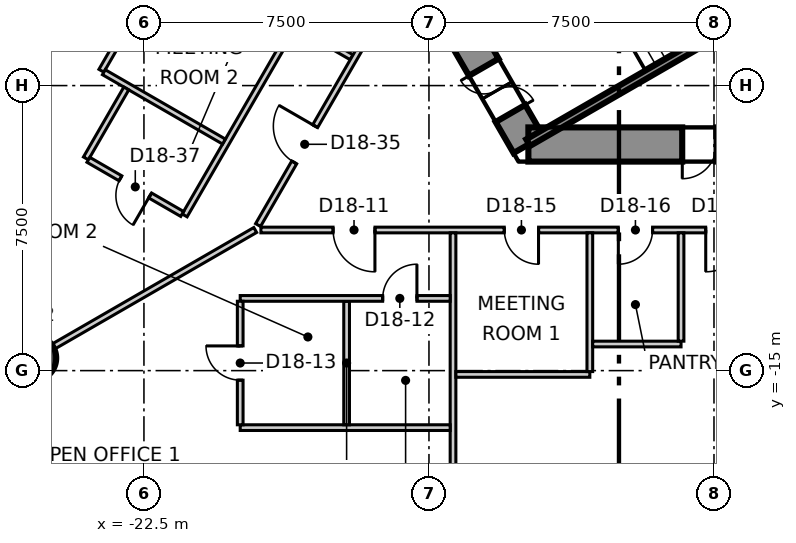
"""IFC4 building model, lengths in metres.
Left out: names, types, materials, properties, quantities, classifications, styles, units other than length and angle.
Written with IfcOpenShell. Run it as: python <this file> out.ifc"""

import sys

from ifc_helpers import new_model, si_unit, direction, frame, frame_2d, origin, origin_2d, place, context, subcontext, project, spatial, polyline, rectangle, circle, outline, extrude, element, fill, save


model = new_model("IFC4")
c1 = context("Model", 3, precision=1e-05, world=origin(), true_north=direction((0.0, 1.0)))
c2 = subcontext(c1, "Body", "Model", "MODEL_VIEW")
j1 = project(units=[si_unit("LENGTHUNIT", "METRE"), si_unit("PLANEANGLEUNIT", "RADIAN")], contexts=[c1])
p1 = place(None, origin())
s1 = spatial("IfcSite", under=j1, at=p1, CompositionType="ELEMENT")
p2 = place(p1, origin())
s2 = spatial("IfcBuilding", under=s1, at=p2, CompositionType="ELEMENT")
p3 = place(p2, frame((0.0, 0.0, 83.3)))
s3 = spatial("IfcBuildingStorey", under=s2, at=p3, CompositionType="ELEMENT", Elevation=83.3)
p4 = place(p3, frame((-14.03, -6.2, -0.3), z_axis=(0.0, 0.0, 1.0), x_axis=(0.500111984565, -0.865960739811, 0.0)))
e1 = element("IfcWall", 1, at=p4, inside=s3, PredefinedType="SHEAR", context=c2, shape_type="SweptSolid", body=[
    extrude(outline(polyline([(-0.26, -0.449), (1.646, -0.449), (3.551, -0.45), (3.032, 0.45), (1.646, 0.45), (0.26, 0.45), (-0.26, -0.449)])), origin(), (0.0, 0.0, 1.0), 4.0),
])
p5 = place(p4, frame((0.946, 0.0, 0.3)))
e2 = element("IfcOpeningElement", 2, at=p5, cuts=e1, PredefinedType="OPENING", context=c2, shape_type="SweptSolid", body=[
    extrude(rectangle(XDim=1.4, YDim=2.1, at=frame_2d((0.7, 1.05))), frame((0.0, 0.46, 0.0), z_axis=(0.0, -1.0, 0.0), x_axis=(1.0, 0.0, 0.0)), (0.0, 0.0, 1.0), 0.92),
])
p6 = place(p3, frame((-12.384, -9.05, -0.3), z_axis=(0.0, 0.0, 1.0), x_axis=(1.0, 0.0, 0.0)))
e3 = element("IfcWall", 3, at=p6, inside=s3, PredefinedType="SHEAR", context=c2, shape_type="SweptSolid", body=[
    extrude(outline(polyline([(-0.26, -0.45), (1.685, -0.45), (3.63, -0.45), (5.576, -0.45), (7.521, -0.45), (9.466, -0.45), (11.411, -0.45), (13.357, -0.45), (15.302, -0.45), (17.247, -0.45), (19.192, -0.45), (21.138, -0.45), (23.083, -0.45), (25.028, -0.45), (24.508, 0.45), (22.643, 0.45), (20.778, 0.45), (18.912, 0.45), (17.047, 0.45), (15.182, 0.45), (13.317, 0.45), (11.451, 0.45), (9.586, 0.45), (7.721, 0.45), (5.856, 0.45), (3.99, 0.45), (2.125, 0.45), (0.26, 0.45), (-0.26, -0.45)])), origin(), (0.0, 0.0, 1.0), 4.0),
])
p7 = place(p6, frame((4.05, 0.0, 0.3)))
e4 = element("IfcOpeningElement", 4, at=p7, cuts=e3, PredefinedType="OPENING", context=c2, shape_type="SweptSolid", body=[
    extrude(rectangle(XDim=0.9, YDim=2.1, at=frame_2d((0.45, 1.05))), frame((0.0, 0.46, 0.0), z_axis=(0.0, -1.0, 0.0), x_axis=(1.0, 0.0, 0.0)), (0.0, 0.0, 1.0), 0.92),
])
p8 = place(p6, frame((15.32, 0.0, 0.3)))
e5 = element("IfcOpeningElement", 5, at=p8, cuts=e3, PredefinedType="OPENING", context=c2, shape_type="SweptSolid", body=[
    extrude(rectangle(XDim=0.9, YDim=2.1, at=frame_2d((0.45, 1.05))), frame((0.0, 0.46, 0.0), z_axis=(0.0, -1.0, 0.0), x_axis=(1.0, 0.0, 0.0)), (0.0, 0.0, 1.0), 0.92),
])
p9 = place(p3, frame((-25.409, -14.67, -0.3), z_axis=(0.0, 0.0, 1.0), x_axis=(1.0, 0.0, 0.0)))
e6 = element("IfcColumn", 6, at=p9, inside=s3, PredefinedType="COLUMN", context=c2, shape_type="SweptSolid", body=[
    extrude(circle(Radius=0.6, at=origin_2d()), origin(), (0.0, 0.0, 1.0), 4.0),
])
p10 = place(p3, frame((-3.28, 36.577, 0.0), z_axis=(0.0, 0.0, 1.0), x_axis=(-0.500001635065, -0.866024459777, 0.0)))
e7 = element("IfcWall", 7, at=p10, inside=s3, PredefinedType="ELEMENTEDWALL", context=c2, shape_type="SweptSolid", body=[
    extrude(rectangle(XDim=60.053, YDim=0.2, at=frame_2d((30.027, 0.0))), origin(), (0.0, 0.0, 1.0), 3.7),
])
p11 = place(p10, frame((2.094, 0.0, 0.9)))
e8 = element("IfcOpeningElement", 8, at=p11, cuts=e7, PredefinedType="OPENING", context=c2, shape_type="SweptSolid", body=[
    extrude(rectangle(XDim=5.6, YDim=2.5, at=frame_2d((2.8, 1.25))), frame((0.0, 0.11, 0.0), z_axis=(0.0, -1.0, 0.0), x_axis=(1.0, 0.0, 0.0)), (0.0, 0.0, 1.0), 0.22),
])
p12 = place(p10, frame((9.278, 0.0, 0.9)))
e9 = element("IfcOpeningElement", 9, at=p12, cuts=e7, PredefinedType="OPENING", context=c2, shape_type="SweptSolid", body=[
    extrude(rectangle(XDim=5.6, YDim=2.5, at=frame_2d((2.8, 1.25))), frame((0.0, 0.11, 0.0), z_axis=(0.0, -1.0, 0.0), x_axis=(1.0, 0.0, 0.0)), (0.0, 0.0, 1.0), 0.22),
])
p13 = place(p10, frame((16.461, 0.0, 0.9)))
e10 = element("IfcOpeningElement", 10, at=p13, cuts=e7, PredefinedType="OPENING", context=c2, shape_type="SweptSolid", body=[
    extrude(rectangle(XDim=5.6, YDim=2.5, at=frame_2d((2.8, 1.25))), frame((0.0, 0.11, 0.0), z_axis=(0.0, -1.0, 0.0), x_axis=(1.0, 0.0, 0.0)), (0.0, 0.0, 1.0), 0.22),
])
p14 = place(p10, frame((23.645, 0.0, 0.9)))
e11 = element("IfcOpeningElement", 11, at=p14, cuts=e7, PredefinedType="OPENING", context=c2, shape_type="SweptSolid", body=[
    extrude(rectangle(XDim=5.6, YDim=2.5, at=frame_2d((2.8, 1.25))), frame((0.0, 0.11, 0.0), z_axis=(0.0, -1.0, 0.0), x_axis=(1.0, 0.0, 0.0)), (0.0, 0.0, 1.0), 0.22),
])
p15 = place(p10, frame((30.828, 0.0, 0.9)))
e12 = element("IfcOpeningElement", 12, at=p15, cuts=e7, PredefinedType="OPENING", context=c2, shape_type="SweptSolid", body=[
    extrude(rectangle(XDim=5.6, YDim=2.5, at=frame_2d((2.8, 1.25))), frame((0.0, 0.11, 0.0), z_axis=(0.0, -1.0, 0.0), x_axis=(1.0, 0.0, 0.0)), (0.0, 0.0, 1.0), 0.22),
])
p16 = place(p10, frame((38.012, 0.0, 0.9)))
e13 = element("IfcOpeningElement", 13, at=p16, cuts=e7, PredefinedType="OPENING", context=c2, shape_type="SweptSolid", body=[
    extrude(rectangle(XDim=5.6, YDim=2.5, at=frame_2d((2.8, 1.25))), frame((0.0, 0.11, 0.0), z_axis=(0.0, -1.0, 0.0), x_axis=(1.0, 0.0, 0.0)), (0.0, 0.0, 1.0), 0.22),
])
p17 = place(p10, frame((45.195, 0.0, 0.9)))
e14 = element("IfcOpeningElement", 14, at=p17, cuts=e7, PredefinedType="OPENING", context=c2, shape_type="SweptSolid", body=[
    extrude(rectangle(XDim=5.6, YDim=2.5, at=frame_2d((2.8, 1.25))), frame((0.0, 0.11, 0.0), z_axis=(0.0, -1.0, 0.0), x_axis=(1.0, 0.0, 0.0)), (0.0, 0.0, 1.0), 0.22),
])
p18 = place(p10, frame((52.379, 0.0, 0.9)))
e15 = element("IfcOpeningElement", 15, at=p18, cuts=e7, PredefinedType="OPENING", context=c2, shape_type="SweptSolid", body=[
    extrude(rectangle(XDim=5.6, YDim=2.5, at=frame_2d((2.8, 1.25))), frame((0.0, 0.11, 0.0), z_axis=(0.0, -1.0, 0.0), x_axis=(1.0, 0.0, 0.0)), (0.0, 0.0, 1.0), 0.22),
])
p19 = place(p3, frame((-25.946, -14.98, 0.0), z_axis=(0.0, 0.0, 1.0), x_axis=(0.866032022822, 0.499988535315, 0.0)))
e16 = element("IfcWall", 16, at=p19, inside=s3, PredefinedType="PARTITIONING", context=c2, shape_type="SweptSolid", body=[
    extrude(rectangle(XDim=7.36, YDim=0.15, at=frame_2d((3.68, 0.0))), origin(), (0.0, 0.0, 1.0), 3.15),
])
p20 = place(p3, frame((-25.413, -1.918, 0.0), z_axis=(0.0, 0.0, 1.0), x_axis=(0.866035557451, -0.499982412921, 0.0)))
e17 = element("IfcWall", 17, at=p20, inside=s3, PredefinedType="PARTITIONING", context=c2, shape_type="SweptSolid", body=[
    extrude(rectangle(XDim=9.674, YDim=0.15, at=frame_2d((4.837, 0.0))), origin(), (0.0, 0.0, 1.0), 3.7),
])
p21 = place(p3, frame((-19.497, -11.17, 0.0), z_axis=(0.0, 0.0, 1.0), x_axis=(0.499998854553, 0.866026065108, 0.0)))
e18 = element("IfcWall", 18, at=p21, inside=s3, PredefinedType="PARTITIONING", context=c2, shape_type="SweptSolid", body=[
    extrude(rectangle(XDim=38.994, YDim=0.15, at=frame_2d((19.497, 0.0))), origin(), (0.0, 0.0, 1.0), 3.7),
])
p22 = place(p21, frame((35.844, 0.0, 0.0)))
e19 = element("IfcOpeningElement", 19, at=p22, cuts=e18, PredefinedType="OPENING", context=c2, shape_type="SweptSolid", body=[
    extrude(rectangle(XDim=1.1, YDim=2.1, at=frame_2d((0.55, 1.05))), frame((0.0, 0.085, 0.0), z_axis=(0.0, -1.0, 0.0), x_axis=(1.0, 0.0, 0.0)), (0.0, 0.0, 1.0), 0.17),
])
p23 = place(p21, frame((26.04, 0.0, 0.0)))
e20 = element("IfcOpeningElement", 20, at=p23, cuts=e18, PredefinedType="OPENING", context=c2, shape_type="SweptSolid", body=[
    extrude(rectangle(XDim=1.1, YDim=2.1, at=frame_2d((0.55, 1.05))), frame((0.0, 0.085, 0.0), z_axis=(0.0, -1.0, 0.0), x_axis=(1.0, 0.0, 0.0)), (0.0, 0.0, 1.0), 0.17),
])
p24 = place(p21, frame((7.272, 0.0, 0.0)))
e21 = element("IfcOpeningElement", 21, at=p24, cuts=e18, PredefinedType="OPENING", context=c2, shape_type="SweptSolid", body=[
    extrude(rectangle(XDim=1.1, YDim=2.1, at=frame_2d((0.55, 1.05))), frame((0.0, 0.085, 0.0), z_axis=(0.0, -1.0, 0.0), x_axis=(1.0, 0.0, 0.0)), (0.0, 0.0, 1.0), 0.17),
])
p25 = place(p21, frame((17.372, 0.0, 0.0)))
e22 = element("IfcOpeningElement", 22, at=p25, cuts=e18, PredefinedType="OPENING", context=c2, shape_type="SweptSolid", body=[
    extrude(rectangle(XDim=0.9, YDim=2.1, at=frame_2d((0.45, 1.05))), frame((0.0, 0.085, 0.0), z_axis=(0.0, -1.0, 0.0), x_axis=(1.0, 0.0, 0.0)), (0.0, 0.0, 1.0), 0.17),
])
p26 = place(p21, frame((14.172, 0.0, 0.0)))
e23 = element("IfcOpeningElement", 23, at=p26, cuts=e18, PredefinedType="OPENING", context=c2, shape_type="SweptSolid", body=[
    extrude(rectangle(XDim=0.9, YDim=2.1, at=frame_2d((0.45, 1.05))), frame((0.0, 0.085, 0.0), z_axis=(0.0, -1.0, 0.0), x_axis=(1.0, 0.0, 0.0)), (0.0, 0.0, 1.0), 0.17),
])
p27 = place(p21, frame((11.272, 0.0, 0.0)))
e24 = element("IfcOpeningElement", 24, at=p27, cuts=e18, PredefinedType="OPENING", context=c2, shape_type="SweptSolid", body=[
    extrude(rectangle(XDim=1.0, YDim=2.1, at=frame_2d((0.5, 1.05))), frame((0.0, 0.085, 0.0), z_axis=(0.0, -1.0, 0.0), x_axis=(1.0, 0.0, 0.0)), (0.0, 0.0, 1.0), 0.17),
])
p28 = place(p21, frame((1.904, 0.0, 0.0)))
e25 = element("IfcOpeningElement", 25, at=p28, cuts=e18, PredefinedType="OPENING", context=c2, shape_type="SweptSolid", body=[
    extrude(rectangle(XDim=1.1, YDim=2.1, at=frame_2d((0.55, 1.05))), frame((0.0, 0.085, 0.0), z_axis=(0.0, -1.0, 0.0), x_axis=(1.0, 0.0, 0.0)), (0.0, 0.0, 1.0), 0.17),
])
p29 = place(p3, frame((-19.422, -11.3, 0.0), z_axis=(0.0, 0.0, 1.0), x_axis=(1.0, 0.0, 0.0)))
e26 = element("IfcWall", 26, at=p29, inside=s3, PredefinedType="PARTITIONING", context=c2, shape_type="SweptSolid", body=[
    extrude(rectangle(XDim=38.994, YDim=0.15, at=frame_2d((19.497, 0.0))), origin(), (0.0, 0.0, 1.0), 3.7),
])
p30 = place(p29, frame((1.9, 0.0, 0.0)))
e27 = element("IfcOpeningElement", 27, at=p30, cuts=e26, PredefinedType="OPENING", context=c2, shape_type="SweptSolid", body=[
    extrude(rectangle(XDim=1.1, YDim=2.1, at=frame_2d((0.55, 1.05))), frame((0.0, 0.085, 0.0), z_axis=(0.0, -1.0, 0.0), x_axis=(1.0, 0.0, 0.0)), (0.0, 0.0, 1.0), 0.17),
])
p31 = place(p29, frame((11.705, 0.0, 0.0)))
e28 = element("IfcOpeningElement", 28, at=p31, cuts=e26, PredefinedType="OPENING", context=c2, shape_type="SweptSolid", body=[
    extrude(rectangle(XDim=1.1, YDim=2.1, at=frame_2d((0.55, 1.05))), frame((0.0, 0.085, 0.0), z_axis=(0.0, -1.0, 0.0), x_axis=(1.0, 0.0, 0.0)), (0.0, 0.0, 1.0), 0.17),
])
p32 = place(p29, frame((6.405, 0.0, 0.0)))
e29 = element("IfcOpeningElement", 29, at=p32, cuts=e26, PredefinedType="OPENING", context=c2, shape_type="SweptSolid", body=[
    extrude(rectangle(XDim=0.9, YDim=2.1, at=frame_2d((0.45, 1.05))), frame((0.0, 0.085, 0.0), z_axis=(0.0, -1.0, 0.0), x_axis=(1.0, 0.0, 0.0)), (0.0, 0.0, 1.0), 0.17),
])
p33 = place(p29, frame((9.405, 0.0, 0.0)))
e30 = element("IfcOpeningElement", 30, at=p33, cuts=e26, PredefinedType="OPENING", context=c2, shape_type="SweptSolid", body=[
    extrude(rectangle(XDim=0.9, YDim=2.1, at=frame_2d((0.45, 1.05))), frame((0.0, 0.085, 0.0), z_axis=(0.0, -1.0, 0.0), x_axis=(1.0, 0.0, 0.0)), (0.0, 0.0, 1.0), 0.17),
])
p34 = place(p29, frame((22.472, 0.0, 0.0)))
e31 = element("IfcOpeningElement", 31, at=p34, cuts=e26, PredefinedType="OPENING", context=c2, shape_type="SweptSolid", body=[
    extrude(rectangle(XDim=1.0, YDim=2.1, at=frame_2d((0.5, 1.05))), frame((0.0, 0.085, 0.0), z_axis=(0.0, -1.0, 0.0), x_axis=(1.0, 0.0, 0.0)), (0.0, 0.0, 1.0), 0.17),
])
p35 = place(p29, frame((29.656, 0.0, 0.0)))
e32 = element("IfcOpeningElement", 32, at=p35, cuts=e26, PredefinedType="OPENING", context=c2, shape_type="SweptSolid", body=[
    extrude(rectangle(XDim=1.0, YDim=2.1, at=frame_2d((0.5, 1.05))), frame((0.0, 0.085, 0.0), z_axis=(0.0, -1.0, 0.0), x_axis=(1.0, 0.0, 0.0)), (0.0, 0.0, 1.0), 0.17),
])
p36 = place(p29, frame((35.839, 0.0, 0.0)))
e33 = element("IfcOpeningElement", 33, at=p36, cuts=e26, PredefinedType="OPENING", context=c2, shape_type="SweptSolid", body=[
    extrude(rectangle(XDim=1.1, YDim=2.1, at=frame_2d((0.55, 1.05))), frame((0.0, 0.085, 0.0), z_axis=(0.0, -1.0, 0.0), x_axis=(1.0, 0.0, 0.0)), (0.0, 0.0, 1.0), 0.17),
])
p37 = place(p3, frame((-14.367, -21.049, 0.0), z_axis=(0.0, 0.0, 1.0), x_axis=(0.0, 1.0, 0.0)))
e34 = element("IfcWall", 34, at=p37, inside=s3, PredefinedType="PARTITIONING", context=c2, shape_type="SweptSolid", body=[
    extrude(rectangle(XDim=9.674, YDim=0.15, at=frame_2d((4.837, 0.0))), origin(), (0.0, 0.0, 1.0), 3.7),
])
p38 = place(p3, frame((-14.292, -15.1, 0.0), z_axis=(0.0, 0.0, 1.0), x_axis=(1.0, 0.0, 0.0)))
e35 = element("IfcWall", 35, at=p38, inside=s3, PredefinedType="PARTITIONING", context=c2, shape_type="SweptSolid", body=[
    extrude(rectangle(XDim=3.525, YDim=0.15, at=frame_2d((1.762, 0.0))), origin(), (0.0, 0.0, 1.0), 3.7),
])
p39 = place(p3, frame((-10.767, -15.025, 0.0), z_axis=(0.0, 0.0, 1.0), x_axis=(0.0, 1.0, 0.0)))
e36 = element("IfcWall", 36, at=p39, inside=s3, PredefinedType="PARTITIONING", context=c2, shape_type="SweptSolid", body=[
    extrude(rectangle(XDim=3.65, YDim=0.15, at=frame_2d((1.825, 0.0))), origin(), (0.0, 0.0, 1.0), 3.7),
])
p40 = place(p3, frame((-10.692, -14.3, 0.0), z_axis=(0.0, 0.0, 1.0), x_axis=(1.0, 0.0, 0.0)))
e37 = element("IfcWall", 37, at=p40, inside=s3, PredefinedType="PARTITIONING", context=c2, shape_type="SweptSolid", body=[
    extrude(rectangle(XDim=2.325, YDim=0.15, at=frame_2d((1.163, 0.0))), origin(), (0.0, 0.0, 1.0), 3.7),
])
p41 = place(p3, frame((-8.367, -14.225, 0.0), z_axis=(0.0, 0.0, 1.0), x_axis=(0.0, 1.0, 0.0)))
e38 = element("IfcWall", 38, at=p41, inside=s3, PredefinedType="PARTITIONING", context=c2, shape_type="SweptSolid", body=[
    extrude(rectangle(XDim=2.85, YDim=0.15, at=frame_2d((1.425, 0.0))), origin(), (0.0, 0.0, 1.0), 3.7),
])
p42 = place(p3, frame((-21.429, -10.916, 0.0), z_axis=(0.0, 0.0, 1.0), x_axis=(0.500069422629, 0.865985318901, 0.0)))
e39 = element("IfcWall", 39, at=p42, inside=s3, PredefinedType="PARTITIONING", context=c2, shape_type="SweptSolid", body=[
    extrude(rectangle(XDim=5.725, YDim=0.15, at=frame_2d((2.863, 0.0))), origin(), (0.0, 0.0, 1.0), 3.7),
])
p43 = place(p3, frame((-23.62, -7.11, 0.0), z_axis=(0.0, 0.0, 1.0), x_axis=(0.500236053335, 0.865889075427, 0.0)))
e40 = element("IfcWall", 40, at=p43, inside=s3, PredefinedType="PARTITIONING", context=c2, shape_type="SweptSolid", body=[
    extrude(rectangle(XDim=3.525, YDim=0.15, at=frame_2d((1.762, 0.0))), origin(), (0.0, 0.0, 1.0), 3.7),
])
p44 = place(p43, frame((1.35, 0.0, 0.0)))
e41 = element("IfcOpeningElement", 41, at=p44, cuts=e40, PredefinedType="OPENING", context=c2, shape_type="SweptSolid", body=[
    extrude(rectangle(XDim=0.9, YDim=2.1, at=frame_2d((0.45, 1.05))), frame((0.0, 0.085, 0.0), z_axis=(0.0, -1.0, 0.0), x_axis=(1.0, 0.0, 0.0)), (0.0, 0.0, 1.0), 0.17),
])
p45 = place(p3, frame((-23.555, -7.148, 0.0), z_axis=(0.0, 0.0, 1.0), x_axis=(0.866024069551, -0.500002310952, 0.0)))
e42 = element("IfcWall", 42, at=p45, inside=s3, PredefinedType="PARTITIONING", context=c2, shape_type="SweptSolid", body=[
    extrude(rectangle(XDim=3.65, YDim=0.15, at=frame_2d((1.825, 0.0))), origin(), (0.0, 0.0, 1.0), 3.7),
])
p46 = place(p3, frame((-24.027, -9.416, 0.0), z_axis=(0.0, 0.0, 1.0), x_axis=(0.500017365573, 0.866015377534, 0.0)))
e43 = element("IfcWall", 43, at=p46, inside=s3, PredefinedType="PARTITIONING", context=c2, shape_type="SweptSolid", body=[
    extrude(rectangle(XDim=2.126, YDim=0.15, at=frame_2d((1.063, 0.0))), origin(), (0.0, 0.0, 1.0), 3.7),
])
p47 = place(p3, frame((-23.962, -9.453, 0.0), z_axis=(0.0, 0.0, 1.0), x_axis=(0.866004402611, -0.500036373335, 0.0)))
e44 = element("IfcWall", 44, at=p47, inside=s3, PredefinedType="PARTITIONING", context=c2, shape_type="SweptSolid", body=[
    extrude(rectangle(XDim=2.85, YDim=0.15, at=frame_2d((1.425, 0.0))), origin(), (0.0, 0.0, 1.0), 3.7),
])
p48 = place(p47, frame((0.975, 0.0, 0.0)))
e45 = element("IfcOpeningElement", 45, at=p48, cuts=e44, PredefinedType="OPENING", context=c2, shape_type="SweptSolid", body=[
    extrude(rectangle(XDim=0.9, YDim=2.1, at=frame_2d((0.45, 1.05))), frame((0.0, 0.085, 0.0), z_axis=(0.0, -1.0, 0.0), x_axis=(1.0, 0.0, 0.0)), (0.0, 0.0, 1.0), 0.17),
])
p49 = place(p3, frame((-19.967, -16.5, 0.0), z_axis=(0.0, 0.0, 1.0), x_axis=(1.0, 0.0, 0.0)))
e46 = element("IfcWall", 46, at=p49, inside=s3, PredefinedType="PARTITIONING", context=c2, shape_type="SweptSolid", body=[
    extrude(rectangle(XDim=5.525, YDim=0.15, at=frame_2d((2.763, 0.0))), origin(), (0.0, 0.0, 1.0), 3.7),
])
p50 = place(p3, frame((-17.167, -16.425, 0.0), z_axis=(0.0, 0.0, 1.0), x_axis=(0.0, 1.0, 0.0)))
e47 = element("IfcWall", 47, at=p50, inside=s3, PredefinedType="PARTITIONING", context=c2, shape_type="SweptSolid", body=[
    extrude(rectangle(XDim=3.25, YDim=0.15, at=frame_2d((1.625, 0.0))), origin(), (0.0, 0.0, 1.0), 3.7),
])
p51 = place(p3, frame((-19.967, -13.1, 0.0), z_axis=(0.0, 0.0, 1.0), x_axis=(1.0, 0.0, 0.0)))
e48 = element("IfcWall", 48, at=p51, inside=s3, PredefinedType="PARTITIONING", context=c2, shape_type="SweptSolid", body=[
    extrude(rectangle(XDim=5.525, YDim=0.15, at=frame_2d((2.763, 0.0))), origin(), (0.0, 0.0, 1.0), 3.7),
])
p52 = place(p51, frame((3.75, 0.0, 0.0)))
e49 = element("IfcOpeningElement", 49, at=p52, cuts=e48, PredefinedType="OPENING", context=c2, shape_type="SweptSolid", body=[
    extrude(rectangle(XDim=0.9, YDim=2.1, at=frame_2d((0.45, 1.05))), frame((0.0, 0.085, 0.0), z_axis=(0.0, -1.0, 0.0), x_axis=(1.0, 0.0, 0.0)), (0.0, 0.0, 1.0), 0.17),
])
p53 = place(p3, frame((-19.967, -16.425, 0.0), z_axis=(0.0, 0.0, 1.0), x_axis=(0.0, 1.0, 0.0)))
e50 = element("IfcWall", 50, at=p53, inside=s3, PredefinedType="PARTITIONING", context=c2, shape_type="SweptSolid", body=[
    extrude(rectangle(XDim=3.25, YDim=0.15, at=frame_2d((1.625, 0.0))), origin(), (0.0, 0.0, 1.0), 3.7),
])
p54 = place(p53, frame((1.175, 0.0, 0.0)))
e51 = element("IfcOpeningElement", 51, at=p54, cuts=e50, PredefinedType="OPENING", context=c2, shape_type="SweptSolid", body=[
    extrude(rectangle(XDim=0.9, YDim=2.1, at=frame_2d((0.45, 1.05))), frame((0.0, 0.085, 0.0), z_axis=(0.0, -1.0, 0.0), x_axis=(1.0, 0.0, 0.0)), (0.0, 0.0, 1.0), 0.17),
])
p55 = place(p3, frame((-12.39, -9.001, 0.0), z_axis=(0.0, 0.0, 1.0), x_axis=(0.866010975815, 0.500024989144, 0.0)))
e52 = element("IfcWall", 52, at=p55, inside=s3, PredefinedType="SOLIDWALL", context=c2, shape_type="SweptSolid", body=[
    extrude(rectangle(XDim=8.615, YDim=0.2, at=frame_2d((4.308, 0.0))), origin(), (0.0, 0.0, 1.0), 3.7),
])
p56 = place(p30, origin())
e53 = element("IfcDoor", 53, at=p56, inside=s3, OperationType="SINGLE_SWING_RIGHT", PredefinedType="DOOR", context=c2, shape_type="SweptSolid", body=[
    extrude(rectangle(XDim=1.1, YDim=2.1, at=frame_2d((0.55, 1.05))), frame((0.0, 0.025, 0.0), z_axis=(0.0, -1.0, 0.0), x_axis=(1.0, 0.0, 0.0)), (0.0, 0.0, 1.0), 0.05),
])
fill(e27, e53)
p57 = place(p52, origin())
e54 = element("IfcDoor", 54, at=p57, inside=s3, OperationType="SINGLE_SWING_LEFT", PredefinedType="DOOR", context=c2, shape_type="SweptSolid", body=[
    extrude(rectangle(XDim=0.9, YDim=2.1, at=frame_2d((0.45, 1.05))), frame((0.0, 0.025, 0.0), z_axis=(0.0, -1.0, 0.0), x_axis=(1.0, 0.0, 0.0)), (0.0, 0.0, 1.0), 0.05),
])
fill(e49, e54)
p58 = place(p54, origin())
e55 = element("IfcDoor", 55, at=p58, inside=s3, OperationType="SINGLE_SWING_LEFT", PredefinedType="DOOR", context=c2, shape_type="SweptSolid", body=[
    extrude(rectangle(XDim=0.9, YDim=2.1, at=frame_2d((0.45, 1.05))), frame((0.0, 0.025, 0.0), z_axis=(0.0, -1.0, 0.0), x_axis=(1.0, 0.0, 0.0)), (0.0, 0.0, 1.0), 0.05),
])
fill(e51, e55)
p59 = place(p31, origin())
e56 = element("IfcDoor", 56, at=p59, inside=s3, OperationType="SINGLE_SWING_LEFT", PredefinedType="DOOR", context=c2, shape_type="SweptSolid", body=[
    extrude(rectangle(XDim=1.1, YDim=2.1, at=frame_2d((0.55, 1.05))), frame((0.0, 0.025, 0.0), z_axis=(0.0, -1.0, 0.0), x_axis=(1.0, 0.0, 0.0)), (0.0, 0.0, 1.0), 0.05),
])
fill(e28, e56)
p60 = place(p32, origin())
e57 = element("IfcDoor", 57, at=p60, inside=s3, OperationType="SINGLE_SWING_RIGHT", PredefinedType="DOOR", context=c2, shape_type="SweptSolid", body=[
    extrude(rectangle(XDim=0.9, YDim=2.1, at=frame_2d((0.45, 1.05))), frame((0.0, 0.025, 0.0), z_axis=(0.0, -1.0, 0.0), x_axis=(1.0, 0.0, 0.0)), (0.0, 0.0, 1.0), 0.05),
])
fill(e29, e57)
p61 = place(p33, origin())
e58 = element("IfcDoor", 58, at=p61, inside=s3, OperationType="SINGLE_SWING_LEFT", PredefinedType="DOOR", context=c2, shape_type="SweptSolid", body=[
    extrude(rectangle(XDim=0.9, YDim=2.1, at=frame_2d((0.45, 1.05))), frame((0.0, 0.025, 0.0), z_axis=(0.0, -1.0, 0.0), x_axis=(1.0, 0.0, 0.0)), (0.0, 0.0, 1.0), 0.05),
])
fill(e30, e58)
p62 = place(p28, origin())
e59 = element("IfcDoor", 59, at=p62, inside=s3, OperationType="SINGLE_SWING_LEFT", PredefinedType="DOOR", context=c2, shape_type="SweptSolid", body=[
    extrude(rectangle(XDim=1.1, YDim=2.1, at=frame_2d((0.55, 1.05))), frame((0.0, 0.025, 0.0), z_axis=(0.0, -1.0, 0.0), x_axis=(1.0, 0.0, 0.0)), (0.0, 0.0, 1.0), 0.05),
])
fill(e25, e59)
p63 = place(p48, origin())
e60 = element("IfcDoor", 60, at=p63, inside=s3, OperationType="SINGLE_SWING_RIGHT", PredefinedType="DOOR", context=c2, shape_type="SweptSolid", body=[
    extrude(rectangle(XDim=0.9, YDim=2.1, at=frame_2d((0.45, 1.05))), frame((0.0, 0.025, 0.0), z_axis=(0.0, -1.0, 0.0), x_axis=(1.0, 0.0, 0.0)), (0.0, 0.0, 1.0), 0.05),
])
fill(e45, e60)
p64 = place(p5, origin())
e61 = element("IfcDoor", 61, at=p64, inside=s3, OperationType="DOUBLE_DOOR_SINGLE_SWING", PredefinedType="DOOR", context=c2, shape_type="SweptSolid", body=[
    extrude(rectangle(XDim=1.4, YDim=2.1, at=frame_2d((0.7, 1.05))), frame((0.0, 0.025, 0.0), z_axis=(0.0, -1.0, 0.0), x_axis=(1.0, 0.0, 0.0)), (0.0, 0.0, 1.0), 0.05),
])
fill(e2, e61)
p65 = place(p7, origin())
e62 = element("IfcDoor", 62, at=p65, inside=s3, OperationType="SINGLE_SWING_LEFT", PredefinedType="DOOR", context=c2, shape_type="SweptSolid", body=[
    extrude(rectangle(XDim=0.9, YDim=2.1, at=frame_2d((0.45, 1.05))), frame((0.0, 0.025, 0.0), z_axis=(0.0, -1.0, 0.0), x_axis=(1.0, 0.0, 0.0)), (0.0, 0.0, 1.0), 0.05),
])
fill(e4, e62)
save(model, sys.argv[1])
